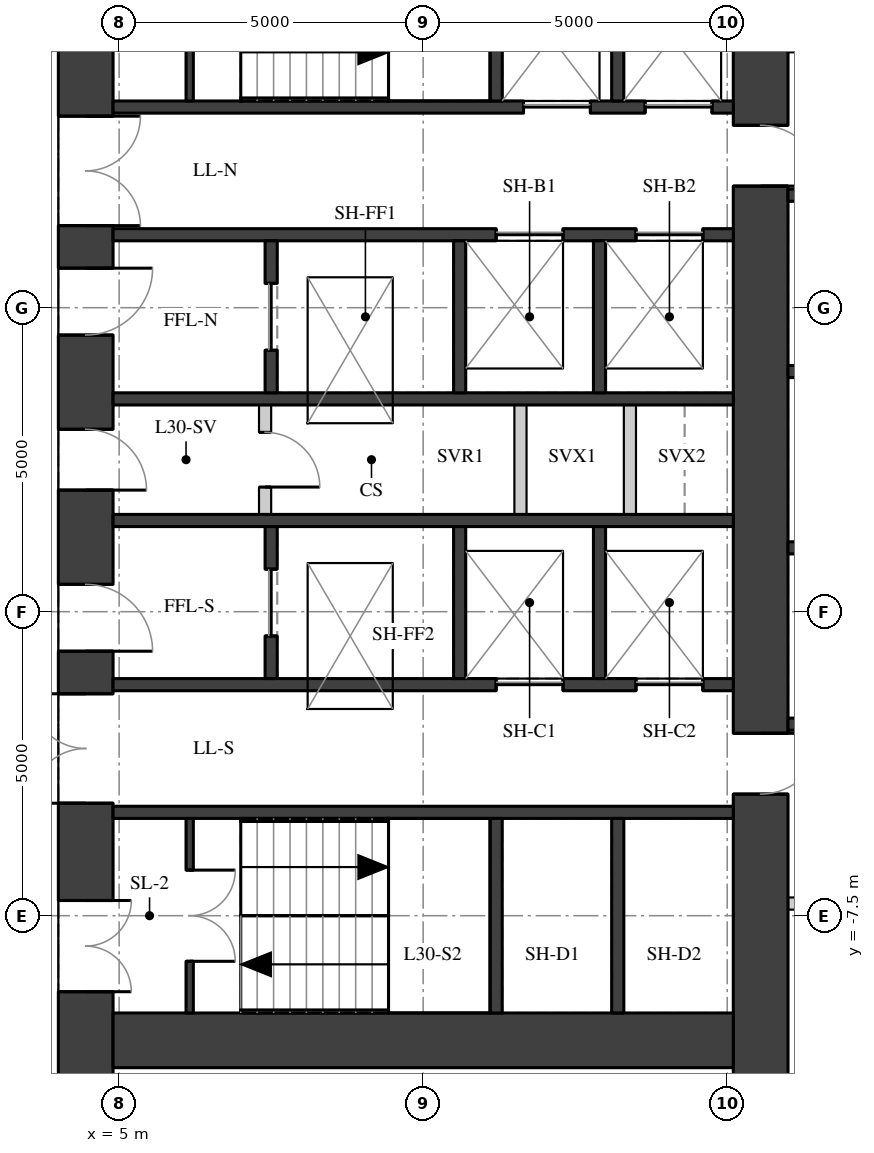
"""IFC4 building model, lengths in metres.
Left out: names, types, materials, properties, quantities, classifications, styles, units other than length and angle.
Written with IfcOpenShell. Run it as: python <this file> out.ifc"""

import sys

from ifc_helpers import new_model, si_unit, direction, frame, frame_2d, origin, place, context, subcontext, project, spatial, rectangle, extrude, element, fill, save


model = new_model("IFC4")
c1 = context("Model", 3, precision=1e-05, world=origin(), true_north=direction((0.0, 1.0)))
c2 = subcontext(c1, "Body", "Model", "MODEL_VIEW")
j1 = project(units=[si_unit("LENGTHUNIT", "METRE"), si_unit("PLANEANGLEUNIT", "RADIAN")], contexts=[c1])
p1 = place(None, origin())
s1 = spatial("IfcSite", under=j1, at=p1, CompositionType="ELEMENT")
p2 = place(p1, origin())
s2 = spatial("IfcBuilding", under=s1, at=p2, CompositionType="ELEMENT")
p3 = place(p2, frame((0.0, 0.0, 108.7)))
s3 = spatial("IfcBuildingStorey", under=s2, at=p3, CompositionType="ELEMENT", Elevation=108.7)
p4 = place(p3, frame((4.45, -11.1, 0.0), z_axis=(0.0, 0.0, 1.0), x_axis=(0.0, 1.0, 0.0)))
e1 = element("IfcWall", 1, at=p4, inside=s3, PredefinedType="SHEAR", context=c2, shape_type="SweptSolid", body=[
    extrude(rectangle(XDim=22.2, YDim=0.9, at=frame_2d((11.1, 0.0))), origin(), (0.0, 0.0, 1.0), 3.02),
])
p5 = place(p4, frame((2.35, 0.0, 0.0)))
e2 = element("IfcOpeningElement", 2, at=p5, cuts=e1, PredefinedType="OPENING", context=c2, shape_type="SweptSolid", body=[
    extrude(rectangle(XDim=1.5, YDim=2.1, at=frame_2d((0.75, 1.05))), frame((0.0, 0.46, 0.0), z_axis=(0.0, -1.0, 0.0), x_axis=(1.0, 0.0, 0.0)), (0.0, 0.0, 1.0), 0.92),
])
p6 = place(p4, frame((5.45, 0.0, 0.0)))
e3 = element("IfcOpeningElement", 3, at=p6, cuts=e1, PredefinedType="OPENING", context=c2, shape_type="SweptSolid", body=[
    extrude(rectangle(XDim=1.8, YDim=2.1, at=frame_2d((0.9, 1.05))), frame((0.0, 0.46, 0.0), z_axis=(0.0, -1.0, 0.0), x_axis=(1.0, 0.0, 0.0)), (0.0, 0.0, 1.0), 0.92),
])
p7 = place(p4, frame((7.95, 0.0, 0.0)))
e4 = element("IfcOpeningElement", 4, at=p7, cuts=e1, PredefinedType="OPENING", context=c2, shape_type="SweptSolid", body=[
    extrude(rectangle(XDim=1.1, YDim=2.1, at=frame_2d((0.55, 1.05))), frame((0.0, 0.46, 0.0), z_axis=(0.0, -1.0, 0.0), x_axis=(1.0, 0.0, 0.0)), (0.0, 0.0, 1.0), 0.92),
])
p8 = place(p4, frame((10.6, 0.0, 0.0)))
e5 = element("IfcOpeningElement", 5, at=p8, cuts=e1, PredefinedType="OPENING", context=c2, shape_type="SweptSolid", body=[
    extrude(rectangle(XDim=1.0, YDim=2.1, at=frame_2d((0.5, 1.05))), frame((0.0, 0.46, 0.0), z_axis=(0.0, -1.0, 0.0), x_axis=(1.0, 0.0, 0.0)), (0.0, 0.0, 1.0), 0.92),
])
p9 = place(p4, frame((13.15, 0.0, 0.0)))
e6 = element("IfcOpeningElement", 6, at=p9, cuts=e1, PredefinedType="OPENING", context=c2, shape_type="SweptSolid", body=[
    extrude(rectangle(XDim=1.1, YDim=2.1, at=frame_2d((0.55, 1.05))), frame((0.0, 0.46, 0.0), z_axis=(0.0, -1.0, 0.0), x_axis=(1.0, 0.0, 0.0)), (0.0, 0.0, 1.0), 0.92),
])
p10 = place(p4, frame((14.95, 0.0, 0.0)))
e7 = element("IfcOpeningElement", 7, at=p10, cuts=e1, PredefinedType="OPENING", context=c2, shape_type="SweptSolid", body=[
    extrude(rectangle(XDim=1.8, YDim=2.1, at=frame_2d((0.9, 1.05))), frame((0.0, 0.46, 0.0), z_axis=(0.0, -1.0, 0.0), x_axis=(1.0, 0.0, 0.0)), (0.0, 0.0, 1.0), 0.92),
])
p11 = place(p4, frame((18.35, 0.0, 0.0)))
e8 = element("IfcOpeningElement", 8, at=p11, cuts=e1, PredefinedType="OPENING", context=c2, shape_type="SweptSolid", body=[
    extrude(rectangle(XDim=1.5, YDim=2.1, at=frame_2d((0.75, 1.05))), frame((0.0, 0.46, 0.0), z_axis=(0.0, -1.0, 0.0), x_axis=(1.0, 0.0, 0.0)), (0.0, 0.0, 1.0), 0.92),
])
p12 = place(p3, frame((15.55, -11.1, 0.0), z_axis=(0.0, 0.0, 1.0), x_axis=(0.0, 1.0, 0.0)))
e9 = element("IfcWall", 9, at=p12, inside=s3, PredefinedType="SHEAR", context=c2, shape_type="SweptSolid", body=[
    extrude(rectangle(XDim=22.2, YDim=0.9, at=frame_2d((11.1, 0.0))), origin(), (0.0, 0.0, 1.0), 3.02),
])
p13 = place(p12, frame((15.6, 0.0, 0.0)))
e10 = element("IfcOpeningElement", 10, at=p13, cuts=e9, PredefinedType="OPENING", context=c2, shape_type="SweptSolid", body=[
    extrude(rectangle(XDim=1.0, YDim=2.1, at=frame_2d((0.5, 1.05))), frame((0.0, 0.46, 0.0), z_axis=(0.0, -1.0, 0.0), x_axis=(1.0, 0.0, 0.0)), (0.0, 0.0, 1.0), 0.92),
])
p14 = place(p12, frame((5.6, 0.0, 0.0)))
e11 = element("IfcOpeningElement", 11, at=p14, cuts=e9, PredefinedType="OPENING", context=c2, shape_type="SweptSolid", body=[
    extrude(rectangle(XDim=1.0, YDim=2.1, at=frame_2d((0.5, 1.05))), frame((0.0, 0.46, 0.0), z_axis=(0.0, -1.0, 0.0), x_axis=(1.0, 0.0, 0.0)), (0.0, 0.0, 1.0), 0.92),
])
p15 = place(p3, frame((4.9, -9.55, 0.0), z_axis=(0.0, 0.0, 1.0), x_axis=(1.0, 0.0, 0.0)))
e12 = element("IfcWall", 12, at=p15, inside=s3, PredefinedType="SHEAR", context=c2, shape_type="SweptSolid", body=[
    extrude(rectangle(XDim=10.2, YDim=0.9, at=frame_2d((5.1, 0.0))), origin(), (0.0, 0.0, 1.0), 3.02),
])
p16 = place(p3, frame((4.9, 5.8, 0.0), z_axis=(0.0, 0.0, 1.0), x_axis=(1.0, 0.0, 0.0)))
e13 = element("IfcWall", 13, at=p16, inside=s3, PredefinedType="SHEAR", context=c2, shape_type="SweptSolid", body=[
    extrude(rectangle(XDim=10.2, YDim=0.2, at=frame_2d((5.1, 0.0))), origin(), (0.0, 0.0, 1.0), 3.02),
])
p17 = place(p16, frame((6.75, 0.0, 0.0)))
e14 = element("IfcOpeningElement", 14, at=p17, cuts=e13, PredefinedType="OPENING", context=c2, shape_type="SweptSolid", body=[
    extrude(rectangle(XDim=1.1, YDim=2.1, at=frame_2d((0.55, 1.05))), frame((0.0, 0.11, 0.0), z_axis=(0.0, -1.0, 0.0), x_axis=(1.0, 0.0, 0.0)), (0.0, 0.0, 1.0), 0.22),
])
p18 = place(p16, frame((8.75, 0.0, 0.0)))
e15 = element("IfcOpeningElement", 15, at=p18, cuts=e13, PredefinedType="OPENING", context=c2, shape_type="SweptSolid", body=[
    extrude(rectangle(XDim=1.1, YDim=2.1, at=frame_2d((0.55, 1.05))), frame((0.0, 0.11, 0.0), z_axis=(0.0, -1.0, 0.0), x_axis=(1.0, 0.0, 0.0)), (0.0, 0.0, 1.0), 0.22),
])
p19 = place(p3, frame((4.9, 3.7, 0.0), z_axis=(0.0, 0.0, 1.0), x_axis=(1.0, 0.0, 0.0)))
e16 = element("IfcWall", 16, at=p19, inside=s3, PredefinedType="SHEAR", context=c2, shape_type="SweptSolid", body=[
    extrude(rectangle(XDim=10.2, YDim=0.2, at=frame_2d((5.1, 0.0))), origin(), (0.0, 0.0, 1.0), 3.02),
])
p20 = place(p19, frame((6.3, 0.0, 0.0)))
e17 = element("IfcOpeningElement", 17, at=p20, cuts=e16, PredefinedType="OPENING", context=c2, shape_type="SweptSolid", body=[
    extrude(rectangle(XDim=1.1, YDim=2.1, at=frame_2d((0.55, 1.05))), frame((0.0, 0.11, 0.0), z_axis=(0.0, -1.0, 0.0), x_axis=(1.0, 0.0, 0.0)), (0.0, 0.0, 1.0), 0.22),
])
p21 = place(p19, frame((8.6, 0.0, 0.0)))
e18 = element("IfcOpeningElement", 18, at=p21, cuts=e16, PredefinedType="OPENING", context=c2, shape_type="SweptSolid", body=[
    extrude(rectangle(XDim=1.1, YDim=2.1, at=frame_2d((0.55, 1.05))), frame((0.0, 0.11, 0.0), z_axis=(0.0, -1.0, 0.0), x_axis=(1.0, 0.0, 0.0)), (0.0, 0.0, 1.0), 0.22),
])
for number, where, z_axis, x_axis in (
    (19, (4.9, 1.0, 0.0), (0.0, 0.0, 1.0), (1.0, 0.0, 0.0)),
    (20, (4.9, -1.0, 0.0), (0.0, 0.0, 1.0), (1.0, 0.0, 0.0)),
):
    element("IfcWall", number, at=place(p3, frame(where, z_axis=z_axis, x_axis=x_axis)), inside=s3, PredefinedType="SHEAR", context=c2, shape_type="SweptSolid", body=[
        extrude(rectangle(XDim=10.2, YDim=0.2, at=frame_2d((5.1, 0.0))), origin(), (0.0, 0.0, 1.0), 3.02),
    ])
p22 = place(p3, frame((4.9, -3.7, 0.0), z_axis=(0.0, 0.0, 1.0), x_axis=(1.0, 0.0, 0.0)))
e21 = element("IfcWall", 21, at=p22, inside=s3, PredefinedType="SHEAR", context=c2, shape_type="SweptSolid", body=[
    extrude(rectangle(XDim=10.2, YDim=0.2, at=frame_2d((5.1, 0.0))), origin(), (0.0, 0.0, 1.0), 3.02),
])
p23 = place(p22, frame((6.3, 0.0, 0.0)))
e22 = element("IfcOpeningElement", 22, at=p23, cuts=e21, PredefinedType="OPENING", context=c2, shape_type="SweptSolid", body=[
    extrude(rectangle(XDim=1.1, YDim=2.1, at=frame_2d((0.55, 1.05))), frame((0.0, 0.11, 0.0), z_axis=(0.0, -1.0, 0.0), x_axis=(1.0, 0.0, 0.0)), (0.0, 0.0, 1.0), 0.22),
])
p24 = place(p22, frame((8.6, 0.0, 0.0)))
e23 = element("IfcOpeningElement", 23, at=p24, cuts=e21, PredefinedType="OPENING", context=c2, shape_type="SweptSolid", body=[
    extrude(rectangle(XDim=1.1, YDim=2.1, at=frame_2d((0.55, 1.05))), frame((0.0, 0.11, 0.0), z_axis=(0.0, -1.0, 0.0), x_axis=(1.0, 0.0, 0.0)), (0.0, 0.0, 1.0), 0.22),
])
p25 = place(p3, frame((4.9, -5.8, 0.0), z_axis=(0.0, 0.0, 1.0), x_axis=(1.0, 0.0, 0.0)))
e24 = element("IfcWall", 24, at=p25, inside=s3, PredefinedType="SHEAR", context=c2, shape_type="SweptSolid", body=[
    extrude(rectangle(XDim=10.2, YDim=0.2, at=frame_2d((5.1, 0.0))), origin(), (0.0, 0.0, 1.0), 3.02),
])
for number, where, z_axis, x_axis in (
    (25, (11.2, 5.9, 0.0), (0.0, 0.0, 1.0), (0.0, 1.0, 0.0)),
    (26, (11.2, -9.1, 0.0), (0.0, 0.0, 1.0), (0.0, 1.0, 0.0)),
    (27, (13.2, 5.9, 0.0), (0.0, 0.0, 1.0), (0.0, 1.0, 0.0)),
    (28, (13.2, -9.1, 0.0), (0.0, 0.0, 1.0), (0.0, 1.0, 0.0)),
):
    element("IfcWall", number, at=place(p3, frame(where, z_axis=z_axis, x_axis=x_axis)), inside=s3, PredefinedType="SHEAR", context=c2, shape_type="SweptSolid", body=[
        extrude(rectangle(XDim=3.2, YDim=0.2, at=frame_2d((1.6, 0.0))), origin(), (0.0, 0.0, 1.0), 3.02),
    ])
p26 = place(p3, frame((7.5, 1.1, 0.0), z_axis=(0.0, 0.0, 1.0), x_axis=(0.0, 1.0, 0.0)))
e29 = element("IfcWall", 29, at=p26, inside=s3, PredefinedType="SHEAR", context=c2, shape_type="SweptSolid", body=[
    extrude(rectangle(XDim=2.5, YDim=0.2, at=frame_2d((1.25, 0.0))), origin(), (0.0, 0.0, 1.0), 3.02),
])
p27 = place(p26, frame((0.7, 0.0, 0.0)))
e30 = element("IfcOpeningElement", 30, at=p27, cuts=e29, PredefinedType="OPENING", context=c2, shape_type="SweptSolid", body=[
    extrude(rectangle(XDim=1.1, YDim=2.1, at=frame_2d((0.55, 1.05))), frame((0.0, 0.11, 0.0), z_axis=(0.0, -1.0, 0.0), x_axis=(1.0, 0.0, 0.0)), (0.0, 0.0, 1.0), 0.22),
])
p28 = place(p3, frame((7.5, -3.6, 0.0), z_axis=(0.0, 0.0, 1.0), x_axis=(0.0, 1.0, 0.0)))
e31 = element("IfcWall", 31, at=p28, inside=s3, PredefinedType="SHEAR", context=c2, shape_type="SweptSolid", body=[
    extrude(rectangle(XDim=2.5, YDim=0.2, at=frame_2d((1.25, 0.0))), origin(), (0.0, 0.0, 1.0), 3.02),
])
p29 = place(p28, frame((0.7, 0.0, 0.0)))
e32 = element("IfcOpeningElement", 32, at=p29, cuts=e31, PredefinedType="OPENING", context=c2, shape_type="SweptSolid", body=[
    extrude(rectangle(XDim=1.1, YDim=2.1, at=frame_2d((0.55, 1.05))), frame((0.0, 0.11, 0.0), z_axis=(0.0, -1.0, 0.0), x_axis=(1.0, 0.0, 0.0)), (0.0, 0.0, 1.0), 0.22),
])
for number, where, z_axis, x_axis in (
    (33, (10.6, 1.1, 0.0), (0.0, 0.0, 1.0), (0.0, 1.0, 0.0)),
    (34, (10.6, -3.6, 0.0), (0.0, 0.0, 1.0), (0.0, 1.0, 0.0)),
    (35, (12.9, 1.1, 0.0), (0.0, 0.0, 1.0), (0.0, 1.0, 0.0)),
    (36, (12.9, -3.6, 0.0), (0.0, 0.0, 1.0), (0.0, 1.0, 0.0)),
):
    element("IfcWall", number, at=place(p3, frame(where, z_axis=z_axis, x_axis=x_axis)), inside=s3, PredefinedType="SHEAR", context=c2, shape_type="SweptSolid", body=[
        extrude(rectangle(XDim=2.5, YDim=0.2, at=frame_2d((1.25, 0.0))), origin(), (0.0, 0.0, 1.0), 3.02),
    ])
p30 = place(p3, frame((6.16, 5.9, 0.0), z_axis=(0.0, 0.0, 1.0), x_axis=(0.0, 1.0, 0.0)))
e37 = element("IfcWall", 37, at=p30, inside=s3, PredefinedType="SHEAR", context=c2, shape_type="SweptSolid", body=[
    extrude(rectangle(XDim=3.2, YDim=0.12, at=frame_2d((1.6, 0.0))), origin(), (0.0, 0.0, 1.0), 3.02),
])
p31 = place(p30, frame((0.85, 0.0, 0.0)))
e38 = element("IfcOpeningElement", 38, at=p31, cuts=e37, PredefinedType="OPENING", context=c2, shape_type="SweptSolid", body=[
    extrude(rectangle(XDim=1.5, YDim=2.1, at=frame_2d((0.75, 1.05))), frame((0.0, 0.07, 0.0), z_axis=(0.0, -1.0, 0.0), x_axis=(1.0, 0.0, 0.0)), (0.0, 0.0, 1.0), 0.14),
])
p32 = place(p3, frame((6.16, -9.1, 0.0), z_axis=(0.0, 0.0, 1.0), x_axis=(0.0, 1.0, 0.0)))
e39 = element("IfcWall", 39, at=p32, inside=s3, PredefinedType="SHEAR", context=c2, shape_type="SweptSolid", body=[
    extrude(rectangle(XDim=3.2, YDim=0.12, at=frame_2d((1.6, 0.0))), origin(), (0.0, 0.0, 1.0), 3.02),
])
p33 = place(p32, frame((0.85, 0.0, 0.0)))
e40 = element("IfcOpeningElement", 40, at=p33, cuts=e39, PredefinedType="OPENING", context=c2, shape_type="SweptSolid", body=[
    extrude(rectangle(XDim=1.5, YDim=2.1, at=frame_2d((0.75, 1.05))), frame((0.0, 0.07, 0.0), z_axis=(0.0, -1.0, 0.0), x_axis=(1.0, 0.0, 0.0)), (0.0, 0.0, 1.0), 0.14),
])
p34 = place(p3, frame((7.4, -0.9, 0.0), z_axis=(0.0, 0.0, 1.0), x_axis=(0.0, 1.0, 0.0)))
e41 = element("IfcWall", 41, at=p34, inside=s3, PredefinedType="PARTITIONING", context=c2, shape_type="SweptSolid", body=[
    extrude(rectangle(XDim=1.8, YDim=0.2, at=frame_2d((0.9, 0.0))), origin(), (0.0, 0.0, 1.0), 3.02),
])
p35 = place(p34, frame((0.45, 0.0, 0.0)))
e42 = element("IfcOpeningElement", 42, at=p35, cuts=e41, PredefinedType="OPENING", context=c2, shape_type="SweptSolid", body=[
    extrude(rectangle(XDim=0.9, YDim=2.1, at=frame_2d((0.45, 1.05))), frame((0.0, 0.11, 0.0), z_axis=(0.0, -1.0, 0.0), x_axis=(1.0, 0.0, 0.0)), (0.0, 0.0, 1.0), 0.22),
])
for number, where, z_axis, x_axis in (
    (43, (11.6, -0.9, 0.0), (0.0, 0.0, 1.0), (0.0, 1.0, 0.0)),
    (44, (13.4, -0.9, 0.0), (0.0, 0.0, 1.0), (0.0, 1.0, 0.0)),
):
    element("IfcWall", number, at=place(p3, frame(where, z_axis=z_axis, x_axis=x_axis)), inside=s3, PredefinedType="PARTITIONING", context=c2, shape_type="SweptSolid", body=[
        extrude(rectangle(XDim=1.8, YDim=0.2, at=frame_2d((0.9, 0.0))), origin(), (0.0, 0.0, 1.0), 3.02),
    ])
for number, where, z_axis, x_axis in (
    (45, (16.0, -4.35, 0.0), (0.0, 0.0, 1.0), (1.0, 0.0, 0.0)),
    (46, (16.0, -1.45, 0.0), (0.0, 0.0, 1.0), (1.0, 0.0, 0.0)),
    (47, (16.0, 1.45, 0.0), (0.0, 0.0, 1.0), (1.0, 0.0, 0.0)),
    (48, (16.0, 4.35, 0.0), (0.0, 0.0, 1.0), (1.0, 0.0, 0.0)),
):
    element("IfcWall", number, at=place(p3, frame(where, z_axis=z_axis, x_axis=x_axis)), inside=s3, PredefinedType="SHEAR", context=c2, shape_type="SweptSolid", body=[
        extrude(rectangle(XDim=2.3, YDim=0.2, at=frame_2d((1.15, 0.0))), origin(), (0.0, 0.0, 1.0), 3.02),
    ])
p36 = place(p3, frame((16.0, -7.3, 0.0), z_axis=(0.0, 0.0, 1.0), x_axis=(1.0, 0.0, 0.0)))
e49 = element("IfcWall", 49, at=p36, inside=s3, PredefinedType="PARTITIONING", context=c2, shape_type="SweptSolid", body=[
    extrude(rectangle(XDim=2.3, YDim=0.2, at=frame_2d((1.15, 0.0))), origin(), (0.0, 0.0, 1.0), 3.02),
])
p37 = place(p36, frame((0.3, 0.0, 0.0)))
e50 = element("IfcOpeningElement", 50, at=p37, cuts=e49, PredefinedType="OPENING", context=c2, shape_type="SweptSolid", body=[
    extrude(rectangle(XDim=0.9, YDim=2.1, at=frame_2d((0.45, 1.05))), frame((0.0, 0.11, 0.0), z_axis=(0.0, -1.0, 0.0), x_axis=(1.0, 0.0, 0.0)), (0.0, 0.0, 1.0), 0.22),
])
p38 = place(p5, origin())
e51 = element("IfcDoor", 51, at=p38, inside=s3, OperationType="DOUBLE_DOOR_SINGLE_SWING", PredefinedType="DOOR", context=c2, shape_type="SweptSolid", body=[
    extrude(rectangle(XDim=1.5, YDim=2.1, at=frame_2d((0.75, 1.05))), frame((0.0, 0.025, 0.0), z_axis=(0.0, -1.0, 0.0), x_axis=(1.0, 0.0, 0.0)), (0.0, 0.0, 1.0), 0.05),
])
fill(e2, e51)
p39 = place(p6, origin())
e52 = element("IfcDoor", 52, at=p39, inside=s3, OperationType="DOUBLE_DOOR_SINGLE_SWING", PredefinedType="DOOR", context=c2, shape_type="SweptSolid", body=[
    extrude(rectangle(XDim=1.8, YDim=2.1, at=frame_2d((0.9, 1.05))), frame((0.0, 0.025, 0.0), z_axis=(0.0, -1.0, 0.0), x_axis=(1.0, 0.0, 0.0)), (0.0, 0.0, 1.0), 0.05),
])
fill(e3, e52)
p40 = place(p7, origin())
e53 = element("IfcDoor", 53, at=p40, inside=s3, OperationType="SINGLE_SWING_RIGHT", PredefinedType="DOOR", context=c2, shape_type="SweptSolid", body=[
    extrude(rectangle(XDim=1.1, YDim=2.1, at=frame_2d((0.55, 1.05))), frame((0.0, 0.025, 0.0), z_axis=(0.0, -1.0, 0.0), x_axis=(1.0, 0.0, 0.0)), (0.0, 0.0, 1.0), 0.05),
])
fill(e4, e53)
p41 = place(p8, origin())
e54 = element("IfcDoor", 54, at=p41, inside=s3, OperationType="SINGLE_SWING_RIGHT", PredefinedType="DOOR", context=c2, shape_type="SweptSolid", body=[
    extrude(rectangle(XDim=1.0, YDim=2.1, at=frame_2d((0.5, 1.05))), frame((0.0, 0.025, 0.0), z_axis=(0.0, -1.0, 0.0), x_axis=(1.0, 0.0, 0.0)), (0.0, 0.0, 1.0), 0.05),
])
fill(e5, e54)
p42 = place(p9, origin())
e55 = element("IfcDoor", 55, at=p42, inside=s3, OperationType="SINGLE_SWING_LEFT", PredefinedType="DOOR", context=c2, shape_type="SweptSolid", body=[
    extrude(rectangle(XDim=1.1, YDim=2.1, at=frame_2d((0.55, 1.05))), frame((0.0, 0.025, 0.0), z_axis=(0.0, -1.0, 0.0), x_axis=(1.0, 0.0, 0.0)), (0.0, 0.0, 1.0), 0.05),
])
fill(e6, e55)
p43 = place(p10, origin())
e56 = element("IfcDoor", 56, at=p43, inside=s3, OperationType="DOUBLE_DOOR_SINGLE_SWING", PredefinedType="DOOR", context=c2, shape_type="SweptSolid", body=[
    extrude(rectangle(XDim=1.8, YDim=2.1, at=frame_2d((0.9, 1.05))), frame((0.0, 0.025, 0.0), z_axis=(0.0, -1.0, 0.0), x_axis=(1.0, 0.0, 0.0)), (0.0, 0.0, 1.0), 0.05),
])
fill(e7, e56)
p44 = place(p33, origin())
e57 = element("IfcDoor", 57, at=p44, inside=s3, OperationType="DOUBLE_DOOR_SINGLE_SWING", PredefinedType="DOOR", context=c2, shape_type="SweptSolid", body=[
    extrude(rectangle(XDim=1.5, YDim=2.1, at=frame_2d((0.75, 1.05))), frame((0.0, 0.025, 0.0), z_axis=(0.0, -1.0, 0.0), x_axis=(1.0, 0.0, 0.0)), (0.0, 0.0, 1.0), 0.05),
])
fill(e40, e57)
p45 = place(p17, origin())
e58 = element("IfcDoor", 58, at=p45, inside=s3, OperationType="DOUBLE_DOOR_SLIDING", PredefinedType="DOOR", context=c2, shape_type="SweptSolid", body=[
    extrude(rectangle(XDim=1.1, YDim=2.1, at=frame_2d((0.55, 1.05))), frame((0.0, 0.025, 0.0), z_axis=(0.0, -1.0, 0.0), x_axis=(1.0, 0.0, 0.0)), (0.0, 0.0, 1.0), 0.05),
])
fill(e14, e58)
p46 = place(p18, origin())
e59 = element("IfcDoor", 59, at=p46, inside=s3, OperationType="DOUBLE_DOOR_SLIDING", PredefinedType="DOOR", context=c2, shape_type="SweptSolid", body=[
    extrude(rectangle(XDim=1.1, YDim=2.1, at=frame_2d((0.55, 1.05))), frame((0.0, 0.025, 0.0), z_axis=(0.0, -1.0, 0.0), x_axis=(1.0, 0.0, 0.0)), (0.0, 0.0, 1.0), 0.05),
])
fill(e15, e59)
p47 = place(p20, origin())
e60 = element("IfcDoor", 60, at=p47, inside=s3, OperationType="DOUBLE_DOOR_SLIDING", PredefinedType="DOOR", context=c2, shape_type="SweptSolid", body=[
    extrude(rectangle(XDim=1.1, YDim=2.1, at=frame_2d((0.55, 1.05))), frame((0.0, 0.025, 0.0), z_axis=(0.0, -1.0, 0.0), x_axis=(1.0, 0.0, 0.0)), (0.0, 0.0, 1.0), 0.05),
])
fill(e17, e60)
p48 = place(p21, origin())
e61 = element("IfcDoor", 61, at=p48, inside=s3, OperationType="DOUBLE_DOOR_SLIDING", PredefinedType="DOOR", context=c2, shape_type="SweptSolid", body=[
    extrude(rectangle(XDim=1.1, YDim=2.1, at=frame_2d((0.55, 1.05))), frame((0.0, 0.025, 0.0), z_axis=(0.0, -1.0, 0.0), x_axis=(1.0, 0.0, 0.0)), (0.0, 0.0, 1.0), 0.05),
])
fill(e18, e61)
p49 = place(p23, origin())
e62 = element("IfcDoor", 62, at=p49, inside=s3, OperationType="DOUBLE_DOOR_SLIDING", PredefinedType="DOOR", context=c2, shape_type="SweptSolid", body=[
    extrude(rectangle(XDim=1.1, YDim=2.1, at=frame_2d((0.55, 1.05))), frame((0.0, 0.025, 0.0), z_axis=(0.0, -1.0, 0.0), x_axis=(1.0, 0.0, 0.0)), (0.0, 0.0, 1.0), 0.05),
])
fill(e22, e62)
p50 = place(p24, origin())
e63 = element("IfcDoor", 63, at=p50, inside=s3, OperationType="DOUBLE_DOOR_SLIDING", PredefinedType="DOOR", context=c2, shape_type="SweptSolid", body=[
    extrude(rectangle(XDim=1.1, YDim=2.1, at=frame_2d((0.55, 1.05))), frame((0.0, 0.025, 0.0), z_axis=(0.0, -1.0, 0.0), x_axis=(1.0, 0.0, 0.0)), (0.0, 0.0, 1.0), 0.05),
])
fill(e23, e63)
p51 = place(p27, origin())
e64 = element("IfcDoor", 64, at=p51, inside=s3, OperationType="DOUBLE_DOOR_SLIDING", PredefinedType="DOOR", context=c2, shape_type="SweptSolid", body=[
    extrude(rectangle(XDim=1.1, YDim=2.1, at=frame_2d((0.55, 1.05))), frame((0.0, 0.025, 0.0), z_axis=(0.0, -1.0, 0.0), x_axis=(1.0, 0.0, 0.0)), (0.0, 0.0, 1.0), 0.05),
])
fill(e30, e64)
p52 = place(p29, origin())
e65 = element("IfcDoor", 65, at=p52, inside=s3, OperationType="DOUBLE_DOOR_SLIDING", PredefinedType="DOOR", context=c2, shape_type="SweptSolid", body=[
    extrude(rectangle(XDim=1.1, YDim=2.1, at=frame_2d((0.55, 1.05))), frame((0.0, 0.025, 0.0), z_axis=(0.0, -1.0, 0.0), x_axis=(1.0, 0.0, 0.0)), (0.0, 0.0, 1.0), 0.05),
])
fill(e32, e65)
p53 = place(p35, origin())
e66 = element("IfcDoor", 66, at=p53, inside=s3, OperationType="SINGLE_SWING_RIGHT", PredefinedType="DOOR", context=c2, shape_type="SweptSolid", body=[
    extrude(rectangle(XDim=0.9, YDim=2.1, at=frame_2d((0.45, 1.05))), frame((0.0, 0.025, 0.0), z_axis=(0.0, -1.0, 0.0), x_axis=(1.0, 0.0, 0.0)), (0.0, 0.0, 1.0), 0.05),
])
fill(e42, e66)
p54 = place(p13, origin())
e67 = element("IfcDoor", 67, at=p54, inside=s3, OperationType="SINGLE_SWING_RIGHT", PredefinedType="DOOR", context=c2, shape_type="SweptSolid", body=[
    extrude(rectangle(XDim=1.0, YDim=2.1, at=frame_2d((0.5, 1.05))), frame((0.0, 0.025, 0.0), z_axis=(0.0, -1.0, 0.0), x_axis=(1.0, 0.0, 0.0)), (0.0, 0.0, 1.0), 0.05),
])
fill(e10, e67)
p55 = place(p14, origin())
e68 = element("IfcDoor", 68, at=p55, inside=s3, OperationType="SINGLE_SWING_LEFT", PredefinedType="DOOR", context=c2, shape_type="SweptSolid", body=[
    extrude(rectangle(XDim=1.0, YDim=2.1, at=frame_2d((0.5, 1.05))), frame((0.0, 0.025, 0.0), z_axis=(0.0, -1.0, 0.0), x_axis=(1.0, 0.0, 0.0)), (0.0, 0.0, 1.0), 0.05),
])
fill(e11, e68)
save(model, sys.argv[1])
